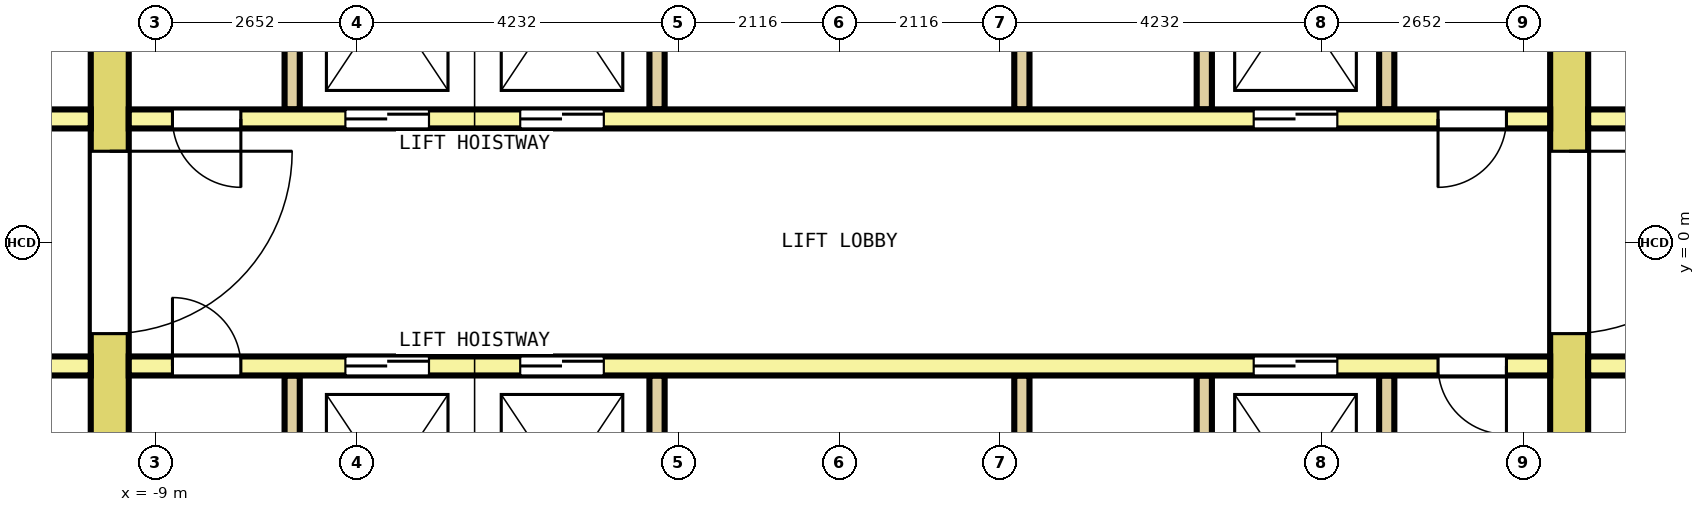
"""IFC4 building model, lengths in metres.
Left out: names, types, materials, properties, quantities, classifications, styles, units other than length and angle.
Written with IfcOpenShell. Run it as: python <this file> out.ifc"""

import sys

from ifc_helpers import new_model, si_unit, direction, frame, frame_2d, origin, place, context, subcontext, project, spatial, rectangle, extrude, element, fill, save


model = new_model("IFC4")
c1 = context("Model", 3, precision=1e-05, world=origin(), true_north=direction((0.0, 1.0)))
c2 = subcontext(c1, "Body", "Model", "MODEL_VIEW")
j1 = project(units=[si_unit("LENGTHUNIT", "METRE"), si_unit("PLANEANGLEUNIT", "RADIAN")], contexts=[c1])
p1 = place(None, origin())
s1 = spatial("IfcSite", under=j1, at=p1, CompositionType="ELEMENT")
p2 = place(p1, origin())
s2 = spatial("IfcBuilding", under=s1, at=p2, CompositionType="ELEMENT")
p3 = place(p2, frame((0.0, 0.0, 126.4)))
s3 = spatial("IfcBuildingStorey", under=s2, at=p3, CompositionType="ELEMENT", Elevation=126.4)
p4 = place(p3, frame((-9.6, -7.7, 0.0), z_axis=(0.0, 0.0, 1.0), x_axis=(0.0, 1.0, 0.0)))
e1 = element("IfcWall", 1, at=p4, inside=s3, PredefinedType="SHEAR", context=c2, shape_type="SweptSolid", body=[
    extrude(rectangle(XDim=15.4, YDim=0.5, at=frame_2d((7.7, 0.0))), origin(), (0.0, 0.0, 1.0), 4.1),
])
p5 = place(p4, frame((6.5, 0.0, 0.0)))
e2 = element("IfcOpeningElement", 2, at=p5, cuts=e1, PredefinedType="OPENING", context=c2, shape_type="SweptSolid", body=[
    extrude(rectangle(XDim=2.4, YDim=2.1, at=frame_2d((1.2, 1.05))), frame((0.0, 0.26, 0.0), z_axis=(0.0, -1.0, 0.0), x_axis=(1.0, 0.0, 0.0)), (0.0, 0.0, 1.0), 0.52),
])
p6 = place(p4, frame((13.4, 0.0, 0.0)))
e3 = element("IfcOpeningElement", 3, at=p6, cuts=e1, PredefinedType="OPENING", context=c2, shape_type="SweptSolid", body=[
    extrude(rectangle(XDim=1.2, YDim=2.1, at=frame_2d((0.6, 1.05))), frame((0.0, 0.26, 0.0), z_axis=(0.0, -1.0, 0.0), x_axis=(1.0, 0.0, 0.0)), (0.0, 0.0, 1.0), 0.52),
])
p7 = place(p4, frame((0.8, 0.0, 0.0)))
e4 = element("IfcOpeningElement", 4, at=p7, cuts=e1, PredefinedType="OPENING", context=c2, shape_type="SweptSolid", body=[
    extrude(rectangle(XDim=1.2, YDim=2.1, at=frame_2d((0.6, 1.05))), frame((0.0, 0.26, 0.0), z_axis=(0.0, -1.0, 0.0), x_axis=(1.0, 0.0, 0.0)), (0.0, 0.0, 1.0), 0.52),
])
p8 = place(p3, frame((9.6, -7.7, 0.0), z_axis=(0.0, 0.0, 1.0), x_axis=(0.0, 1.0, 0.0)))
e5 = element("IfcWall", 5, at=p8, inside=s3, PredefinedType="SHEAR", context=c2, shape_type="SweptSolid", body=[
    extrude(rectangle(XDim=15.4, YDim=0.5, at=frame_2d((7.7, 0.0))), origin(), (0.0, 0.0, 1.0), 4.1),
])
p9 = place(p8, frame((6.5, 0.0, 0.0)))
e6 = element("IfcOpeningElement", 6, at=p9, cuts=e5, PredefinedType="OPENING", context=c2, shape_type="SweptSolid", body=[
    extrude(rectangle(XDim=2.4, YDim=2.1, at=frame_2d((1.2, 1.05))), frame((0.0, 0.26, 0.0), z_axis=(0.0, -1.0, 0.0), x_axis=(1.0, 0.0, 0.0)), (0.0, 0.0, 1.0), 0.52),
])
p10 = place(p8, frame((13.4, 0.0, 0.0)))
e7 = element("IfcOpeningElement", 7, at=p10, cuts=e5, PredefinedType="OPENING", context=c2, shape_type="SweptSolid", body=[
    extrude(rectangle(XDim=1.2, YDim=2.1, at=frame_2d((0.6, 1.05))), frame((0.0, 0.26, 0.0), z_axis=(0.0, -1.0, 0.0), x_axis=(1.0, 0.0, 0.0)), (0.0, 0.0, 1.0), 0.52),
])
p11 = place(p8, frame((0.9, 0.0, 0.0)))
e8 = element("IfcOpeningElement", 8, at=p11, cuts=e5, PredefinedType="OPENING", context=c2, shape_type="SweptSolid", body=[
    extrude(rectangle(XDim=1.0, YDim=2.1, at=frame_2d((0.5, 1.05))), frame((0.0, 0.26, 0.0), z_axis=(0.0, -1.0, 0.0), x_axis=(1.0, 0.0, 0.0)), (0.0, 0.0, 1.0), 0.52),
])
p12 = place(p3, frame((-12.8, 1.625, 0.0), z_axis=(0.0, 0.0, 1.0), x_axis=(1.0, 0.0, 0.0)))
e9 = element("IfcWall", 9, at=p12, inside=s3, PredefinedType="SOLIDWALL", context=c2, shape_type="SweptSolid", body=[
    extrude(rectangle(XDim=2.95, YDim=0.25, at=frame_2d((1.475, 0.0))), origin(), (0.0, 0.0, 1.0), 4.1),
])
p13 = place(p12, frame((1.025, 0.0, 0.0)))
e10 = element("IfcOpeningElement", 10, at=p13, cuts=e9, PredefinedType="OPENING", context=c2, shape_type="SweptSolid", body=[
    extrude(rectangle(XDim=0.9, YDim=2.1, at=frame_2d((0.45, 1.05))), frame((0.0, 0.135, 0.0), z_axis=(0.0, -1.0, 0.0), x_axis=(1.0, 0.0, 0.0)), (0.0, 0.0, 1.0), 0.27),
])
p14 = place(p3, frame((-9.35, 1.625, 0.0), z_axis=(0.0, 0.0, 1.0), x_axis=(1.0, 0.0, 0.0)))
e11 = element("IfcWall", 11, at=p14, inside=s3, PredefinedType="SOLIDWALL", context=c2, shape_type="SweptSolid", body=[
    extrude(rectangle(XDim=18.7, YDim=0.25, at=frame_2d((9.35, 0.0))), origin(), (0.0, 0.0, 1.0), 4.1),
])
p15 = place(p14, frame((2.85, 0.0, 0.0)))
e12 = element("IfcOpeningElement", 12, at=p15, cuts=e11, PredefinedType="OPENING", context=c2, shape_type="SweptSolid", body=[
    extrude(rectangle(XDim=1.1, YDim=2.1, at=frame_2d((0.55, 1.05))), frame((0.0, 0.135, 0.0), z_axis=(0.0, -1.0, 0.0), x_axis=(1.0, 0.0, 0.0)), (0.0, 0.0, 1.0), 0.27),
])
p16 = place(p14, frame((5.15, 0.0, 0.0)))
e13 = element("IfcOpeningElement", 13, at=p16, cuts=e11, PredefinedType="OPENING", context=c2, shape_type="SweptSolid", body=[
    extrude(rectangle(XDim=1.1, YDim=2.1, at=frame_2d((0.55, 1.05))), frame((0.0, 0.135, 0.0), z_axis=(0.0, -1.0, 0.0), x_axis=(1.0, 0.0, 0.0)), (0.0, 0.0, 1.0), 0.27),
])
p17 = place(p14, frame((14.8, 0.0, 0.0)))
e14 = element("IfcOpeningElement", 14, at=p17, cuts=e11, PredefinedType="OPENING", context=c2, shape_type="SweptSolid", body=[
    extrude(rectangle(XDim=1.1, YDim=2.1, at=frame_2d((0.55, 1.05))), frame((0.0, 0.135, 0.0), z_axis=(0.0, -1.0, 0.0), x_axis=(1.0, 0.0, 0.0)), (0.0, 0.0, 1.0), 0.27),
])
p18 = place(p14, frame((0.575, 0.0, 0.0)))
e15 = element("IfcOpeningElement", 15, at=p18, cuts=e11, PredefinedType="OPENING", context=c2, shape_type="SweptSolid", body=[
    extrude(rectangle(XDim=0.9, YDim=2.1, at=frame_2d((0.45, 1.05))), frame((0.0, 0.135, 0.0), z_axis=(0.0, -1.0, 0.0), x_axis=(1.0, 0.0, 0.0)), (0.0, 0.0, 1.0), 0.27),
])
p19 = place(p14, frame((17.225, 0.0, 0.0)))
e16 = element("IfcOpeningElement", 16, at=p19, cuts=e11, PredefinedType="OPENING", context=c2, shape_type="SweptSolid", body=[
    extrude(rectangle(XDim=0.9, YDim=2.1, at=frame_2d((0.45, 1.05))), frame((0.0, 0.135, 0.0), z_axis=(0.0, -1.0, 0.0), x_axis=(1.0, 0.0, 0.0)), (0.0, 0.0, 1.0), 0.27),
])
p20 = place(p3, frame((9.85, 1.625, 0.0), z_axis=(0.0, 0.0, 1.0), x_axis=(1.0, 0.0, 0.0)))
e17 = element("IfcWall", 17, at=p20, inside=s3, PredefinedType="SOLIDWALL", context=c2, shape_type="SweptSolid", body=[
    extrude(rectangle(XDim=2.95, YDim=0.25, at=frame_2d((1.475, 0.0))), origin(), (0.0, 0.0, 1.0), 4.1),
])
p21 = place(p20, frame((1.025, 0.0, 0.0)))
e18 = element("IfcOpeningElement", 18, at=p21, cuts=e17, PredefinedType="OPENING", context=c2, shape_type="SweptSolid", body=[
    extrude(rectangle(XDim=0.9, YDim=2.1, at=frame_2d((0.45, 1.05))), frame((0.0, 0.135, 0.0), z_axis=(0.0, -1.0, 0.0), x_axis=(1.0, 0.0, 0.0)), (0.0, 0.0, 1.0), 0.27),
])
for number, where, z_axis, x_axis in (
    (19, (-7.2, 1.75, 0.0), (0.0, 0.0, 1.0), (0.0, 1.0, 0.0)),
    (20, (-2.4, 1.75, 0.0), (0.0, 0.0, 1.0), (0.0, 1.0, 0.0)),
    (21, (2.4, 1.75, 0.0), (0.0, 0.0, 1.0), (0.0, 1.0, 0.0)),
    (22, (4.8, 1.75, 0.0), (0.0, 0.0, 1.0), (0.0, 1.0, 0.0)),
    (23, (7.2, 1.75, 0.0), (0.0, 0.0, 1.0), (0.0, 1.0, 0.0)),
):
    element("IfcWall", number, at=place(p3, frame(where, z_axis=z_axis, x_axis=x_axis)), inside=s3, PredefinedType="SOLIDWALL", context=c2, shape_type="SweptSolid", body=[
        extrude(rectangle(XDim=2.9, YDim=0.2, at=frame_2d((1.45, 0.0))), origin(), (0.0, 0.0, 1.0), 4.1),
    ])
p22 = place(p3, frame((-12.8, -1.625, 0.0), z_axis=(0.0, 0.0, 1.0), x_axis=(1.0, 0.0, 0.0)))
e24 = element("IfcWall", 24, at=p22, inside=s3, PredefinedType="SOLIDWALL", context=c2, shape_type="SweptSolid", body=[
    extrude(rectangle(XDim=2.95, YDim=0.25, at=frame_2d((1.475, 0.0))), origin(), (0.0, 0.0, 1.0), 4.1),
])
p23 = place(p22, frame((1.025, 0.0, 0.0)))
e25 = element("IfcOpeningElement", 25, at=p23, cuts=e24, PredefinedType="OPENING", context=c2, shape_type="SweptSolid", body=[
    extrude(rectangle(XDim=0.9, YDim=2.1, at=frame_2d((0.45, 1.05))), frame((0.0, 0.135, 0.0), z_axis=(0.0, -1.0, 0.0), x_axis=(1.0, 0.0, 0.0)), (0.0, 0.0, 1.0), 0.27),
])
p24 = place(p3, frame((-9.35, -1.625, 0.0), z_axis=(0.0, 0.0, 1.0), x_axis=(1.0, 0.0, 0.0)))
e26 = element("IfcWall", 26, at=p24, inside=s3, PredefinedType="SOLIDWALL", context=c2, shape_type="SweptSolid", body=[
    extrude(rectangle(XDim=18.7, YDim=0.25, at=frame_2d((9.35, 0.0))), origin(), (0.0, 0.0, 1.0), 4.1),
])
p25 = place(p24, frame((2.85, 0.0, 0.0)))
e27 = element("IfcOpeningElement", 27, at=p25, cuts=e26, PredefinedType="OPENING", context=c2, shape_type="SweptSolid", body=[
    extrude(rectangle(XDim=1.1, YDim=2.1, at=frame_2d((0.55, 1.05))), frame((0.0, 0.135, 0.0), z_axis=(0.0, -1.0, 0.0), x_axis=(1.0, 0.0, 0.0)), (0.0, 0.0, 1.0), 0.27),
])
p26 = place(p24, frame((5.15, 0.0, 0.0)))
e28 = element("IfcOpeningElement", 28, at=p26, cuts=e26, PredefinedType="OPENING", context=c2, shape_type="SweptSolid", body=[
    extrude(rectangle(XDim=1.1, YDim=2.1, at=frame_2d((0.55, 1.05))), frame((0.0, 0.135, 0.0), z_axis=(0.0, -1.0, 0.0), x_axis=(1.0, 0.0, 0.0)), (0.0, 0.0, 1.0), 0.27),
])
p27 = place(p24, frame((14.8, 0.0, 0.0)))
e29 = element("IfcOpeningElement", 29, at=p27, cuts=e26, PredefinedType="OPENING", context=c2, shape_type="SweptSolid", body=[
    extrude(rectangle(XDim=1.1, YDim=2.1, at=frame_2d((0.55, 1.05))), frame((0.0, 0.135, 0.0), z_axis=(0.0, -1.0, 0.0), x_axis=(1.0, 0.0, 0.0)), (0.0, 0.0, 1.0), 0.27),
])
p28 = place(p24, frame((0.575, 0.0, 0.0)))
e30 = element("IfcOpeningElement", 30, at=p28, cuts=e26, PredefinedType="OPENING", context=c2, shape_type="SweptSolid", body=[
    extrude(rectangle(XDim=0.9, YDim=2.1, at=frame_2d((0.45, 1.05))), frame((0.0, 0.135, 0.0), z_axis=(0.0, -1.0, 0.0), x_axis=(1.0, 0.0, 0.0)), (0.0, 0.0, 1.0), 0.27),
])
p29 = place(p24, frame((17.225, 0.0, 0.0)))
e31 = element("IfcOpeningElement", 31, at=p29, cuts=e26, PredefinedType="OPENING", context=c2, shape_type="SweptSolid", body=[
    extrude(rectangle(XDim=0.9, YDim=2.1, at=frame_2d((0.45, 1.05))), frame((0.0, 0.135, 0.0), z_axis=(0.0, -1.0, 0.0), x_axis=(1.0, 0.0, 0.0)), (0.0, 0.0, 1.0), 0.27),
])
p30 = place(p3, frame((9.85, -1.625, 0.0), z_axis=(0.0, 0.0, 1.0), x_axis=(1.0, 0.0, 0.0)))
e32 = element("IfcWall", 32, at=p30, inside=s3, PredefinedType="SOLIDWALL", context=c2, shape_type="SweptSolid", body=[
    extrude(rectangle(XDim=2.95, YDim=0.25, at=frame_2d((1.475, 0.0))), origin(), (0.0, 0.0, 1.0), 4.1),
])
p31 = place(p30, frame((1.025, 0.0, 0.0)))
e33 = element("IfcOpeningElement", 33, at=p31, cuts=e32, PredefinedType="OPENING", context=c2, shape_type="SweptSolid", body=[
    extrude(rectangle(XDim=0.9, YDim=2.1, at=frame_2d((0.45, 1.05))), frame((0.0, 0.135, 0.0), z_axis=(0.0, -1.0, 0.0), x_axis=(1.0, 0.0, 0.0)), (0.0, 0.0, 1.0), 0.27),
])
for number, where, z_axis, x_axis in (
    (34, (-7.2, -4.65, 0.0), (0.0, 0.0, 1.0), (0.0, 1.0, 0.0)),
    (35, (-2.4, -4.65, 0.0), (0.0, 0.0, 1.0), (0.0, 1.0, 0.0)),
    (36, (2.4, -4.65, 0.0), (0.0, 0.0, 1.0), (0.0, 1.0, 0.0)),
    (37, (4.8, -4.65, 0.0), (0.0, 0.0, 1.0), (0.0, 1.0, 0.0)),
    (38, (7.2, -4.65, 0.0), (0.0, 0.0, 1.0), (0.0, 1.0, 0.0)),
):
    element("IfcWall", number, at=place(p3, frame(where, z_axis=z_axis, x_axis=x_axis)), inside=s3, PredefinedType="SOLIDWALL", context=c2, shape_type="SweptSolid", body=[
        extrude(rectangle(XDim=2.9, YDim=0.2, at=frame_2d((1.45, 0.0))), origin(), (0.0, 0.0, 1.0), 4.1),
    ])
p32 = place(p15, origin())
e39 = element("IfcDoor", 39, at=p32, inside=s3, OperationType="DOUBLE_DOOR_SLIDING", PredefinedType="DOOR", context=c2, shape_type="SweptSolid", body=[
    extrude(rectangle(XDim=1.1, YDim=2.1, at=frame_2d((0.55, 1.05))), frame((0.0, 0.075, 0.0), z_axis=(0.0, -1.0, 0.0), x_axis=(1.0, 0.0, 0.0)), (0.0, 0.0, 1.0), 0.15),
])
fill(e12, e39)
p33 = place(p16, origin())
e40 = element("IfcDoor", 40, at=p33, inside=s3, OperationType="DOUBLE_DOOR_SLIDING", PredefinedType="DOOR", context=c2, shape_type="SweptSolid", body=[
    extrude(rectangle(XDim=1.1, YDim=2.1, at=frame_2d((0.55, 1.05))), frame((0.0, 0.075, 0.0), z_axis=(0.0, -1.0, 0.0), x_axis=(1.0, 0.0, 0.0)), (0.0, 0.0, 1.0), 0.15),
])
fill(e13, e40)
p34 = place(p17, origin())
e41 = element("IfcDoor", 41, at=p34, inside=s3, OperationType="DOUBLE_DOOR_SLIDING", PredefinedType="DOOR", context=c2, shape_type="SweptSolid", body=[
    extrude(rectangle(XDim=1.1, YDim=2.1, at=frame_2d((0.55, 1.05))), frame((0.0, 0.075, 0.0), z_axis=(0.0, -1.0, 0.0), x_axis=(1.0, 0.0, 0.0)), (0.0, 0.0, 1.0), 0.15),
])
fill(e14, e41)
p35 = place(p25, origin())
e42 = element("IfcDoor", 42, at=p35, inside=s3, OperationType="DOUBLE_DOOR_SLIDING", PredefinedType="DOOR", context=c2, shape_type="SweptSolid", body=[
    extrude(rectangle(XDim=1.1, YDim=2.1, at=frame_2d((0.55, 1.05))), frame((0.0, 0.075, 0.0), z_axis=(0.0, -1.0, 0.0), x_axis=(1.0, 0.0, 0.0)), (0.0, 0.0, 1.0), 0.15),
])
fill(e27, e42)
p36 = place(p26, origin())
e43 = element("IfcDoor", 43, at=p36, inside=s3, OperationType="DOUBLE_DOOR_SLIDING", PredefinedType="DOOR", context=c2, shape_type="SweptSolid", body=[
    extrude(rectangle(XDim=1.1, YDim=2.1, at=frame_2d((0.55, 1.05))), frame((0.0, 0.075, 0.0), z_axis=(0.0, -1.0, 0.0), x_axis=(1.0, 0.0, 0.0)), (0.0, 0.0, 1.0), 0.15),
])
fill(e28, e43)
p37 = place(p27, origin())
e44 = element("IfcDoor", 44, at=p37, inside=s3, OperationType="DOUBLE_DOOR_SLIDING", PredefinedType="DOOR", context=c2, shape_type="SweptSolid", body=[
    extrude(rectangle(XDim=1.1, YDim=2.1, at=frame_2d((0.55, 1.05))), frame((0.0, 0.075, 0.0), z_axis=(0.0, -1.0, 0.0), x_axis=(1.0, 0.0, 0.0)), (0.0, 0.0, 1.0), 0.15),
])
fill(e29, e44)
p38 = place(p5, origin())
e45 = element("IfcDoor", 45, at=p38, inside=s3, OperationType="DOUBLE_DOOR_SINGLE_SWING", PredefinedType="DOOR", context=c2, shape_type="SweptSolid", body=[
    extrude(rectangle(XDim=2.4, YDim=2.1, at=frame_2d((1.2, 1.05))), frame((0.0, 0.2, 0.0), z_axis=(0.0, -1.0, 0.0), x_axis=(1.0, 0.0, 0.0)), (0.0, 0.0, 1.0), 0.4),
])
fill(e2, e45)
p39 = place(p9, origin())
e46 = element("IfcDoor", 46, at=p39, inside=s3, OperationType="DOUBLE_DOOR_SINGLE_SWING", PredefinedType="DOOR", context=c2, shape_type="SweptSolid", body=[
    extrude(rectangle(XDim=2.4, YDim=2.1, at=frame_2d((1.2, 1.05))), frame((0.0, 0.2, 0.0), z_axis=(0.0, -1.0, 0.0), x_axis=(1.0, 0.0, 0.0)), (0.0, 0.0, 1.0), 0.4),
])
fill(e6, e46)
p40 = place(p18, origin())
e47 = element("IfcDoor", 47, at=p40, inside=s3, OperationType="SINGLE_SWING_LEFT", PredefinedType="DOOR", context=c2, shape_type="SweptSolid", body=[
    extrude(rectangle(XDim=0.9, YDim=2.1, at=frame_2d((0.45, 1.05))), frame((0.0, 0.075, 0.0), z_axis=(0.0, -1.0, 0.0), x_axis=(1.0, 0.0, 0.0)), (0.0, 0.0, 1.0), 0.15),
])
fill(e15, e47)
p41 = place(p19, origin())
e48 = element("IfcDoor", 48, at=p41, inside=s3, OperationType="SINGLE_SWING_RIGHT", PredefinedType="DOOR", context=c2, shape_type="SweptSolid", body=[
    extrude(rectangle(XDim=0.9, YDim=2.1, at=frame_2d((0.45, 1.05))), frame((0.0, 0.075, 0.0), z_axis=(0.0, -1.0, 0.0), x_axis=(1.0, 0.0, 0.0)), (0.0, 0.0, 1.0), 0.15),
])
fill(e16, e48)
p42 = place(p28, origin())
e49 = element("IfcDoor", 49, at=p42, inside=s3, OperationType="SINGLE_SWING_LEFT", PredefinedType="DOOR", context=c2, shape_type="SweptSolid", body=[
    extrude(rectangle(XDim=0.9, YDim=2.1, at=frame_2d((0.45, 1.05))), frame((0.0, 0.075, 0.0), z_axis=(0.0, -1.0, 0.0), x_axis=(1.0, 0.0, 0.0)), (0.0, 0.0, 1.0), 0.15),
])
fill(e30, e49)
p43 = place(p29, origin())
e50 = element("IfcDoor", 50, at=p43, inside=s3, OperationType="SINGLE_SWING_RIGHT", PredefinedType="DOOR", context=c2, shape_type="SweptSolid", body=[
    extrude(rectangle(XDim=0.9, YDim=2.1, at=frame_2d((0.45, 1.05))), frame((0.0, 0.075, 0.0), z_axis=(0.0, -1.0, 0.0), x_axis=(1.0, 0.0, 0.0)), (0.0, 0.0, 1.0), 0.15),
])
fill(e31, e50)
save(model, sys.argv[1])
